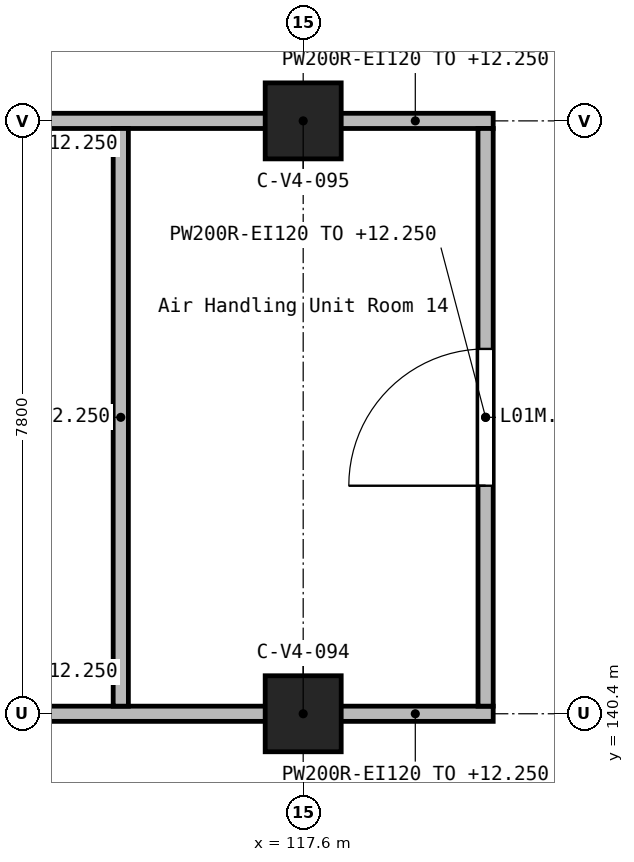
"""IFC4 building model, lengths in metres.
Left out: names, types, materials, properties, quantities, classifications, styles, units other than length and angle.
Written with IfcOpenShell. Run it as: python <this file> out.ifc"""

import sys

from ifc_helpers import new_model, si_unit, direction, frame, frame_2d, origin, origin_2d, place, context, subcontext, project, spatial, rectangle, extrude, element, fill, save


model = new_model("IFC4")
c1 = context("Model", 3, precision=1e-05, world=origin(), true_north=direction((0.0, 1.0)))
c2 = subcontext(c1, "Body", "Model", "MODEL_VIEW")
j1 = project(units=[si_unit("LENGTHUNIT", "METRE"), si_unit("PLANEANGLEUNIT", "RADIAN")], contexts=[c1])
p1 = place(None, origin())
s1 = spatial("IfcSite", under=j1, at=p1, CompositionType="ELEMENT")
p2 = place(p1, origin())
s2 = spatial("IfcBuilding", under=s1, at=p2, CompositionType="ELEMENT")
p3 = place(p2, frame((0.0, 0.0, 9.9)))
s3 = spatial("IfcBuildingStorey", under=s2, at=p3, CompositionType="ELEMENT", Elevation=9.9)
for number, where, z_axis, x_axis in (
    (1, (117.6, 140.4, 0.0), (0.0, 0.0, 1.0), (1.0, 0.0, 0.0)),
    (2, (117.6, 148.2, 0.0), (0.0, 0.0, 1.0), (1.0, 0.0, 0.0)),
):
    element("IfcColumn", number, at=place(p3, frame(where, z_axis=z_axis, x_axis=x_axis)), inside=s3, PredefinedType="COLUMN", context=c2, shape_type="SweptSolid", body=[
        extrude(rectangle(XDim=1.0, YDim=1.0, at=origin_2d()), origin(), (0.0, 0.0, 1.0), 2.7),
    ])
p4 = place(p3, frame((120.1, 140.4, 0.0), z_axis=(0.0, 0.0, 1.0), x_axis=(-1.0, 0.0, 0.0)))
e3 = element("IfcWall", 3, at=p4, inside=s3, PredefinedType="SOLIDWALL", context=c2, shape_type="SweptSolid", body=[
    extrude(rectangle(XDim=2.05, YDim=0.2, at=frame_2d((1.025, 0.0))), origin(), (0.0, 0.0, 1.0), 2.35),
])
p5 = place(p3, frame((117.15, 140.4, 0.0), z_axis=(0.0, 0.0, 1.0), x_axis=(-1.0, 0.0, 0.0)))
e4 = element("IfcWall", 4, at=p5, inside=s3, PredefinedType="SOLIDWALL", context=c2, shape_type="SweptSolid", body=[
    extrude(rectangle(XDim=7.5, YDim=0.2, at=frame_2d((3.75, 0.0))), origin(), (0.0, 0.0, 1.0), 2.35),
])
p6 = place(p5, frame((4.05, 0.0, 0.0)))
e5 = element("IfcOpeningElement", 5, at=p6, cuts=e4, PredefinedType="OPENING", context=c2, shape_type="SweptSolid", body=[
    extrude(rectangle(XDim=1.8, YDim=2.1, at=frame_2d((0.9, 1.05))), frame((0.0, 0.11, 0.0), z_axis=(0.0, -1.0, 0.0), x_axis=(1.0, 0.0, 0.0)), (0.0, 0.0, 1.0), 0.22),
])
p7 = place(p3, frame((120.1, 148.2, 0.0), z_axis=(0.0, 0.0, 1.0), x_axis=(-1.0, 0.0, 0.0)))
e6 = element("IfcWall", 6, at=p7, inside=s3, PredefinedType="SOLIDWALL", context=c2, shape_type="SweptSolid", body=[
    extrude(rectangle(XDim=2.05, YDim=0.2, at=frame_2d((1.025, 0.0))), origin(), (0.0, 0.0, 1.0), 2.35),
])
p8 = place(p3, frame((117.15, 148.2, 0.0), z_axis=(0.0, 0.0, 1.0), x_axis=(-1.0, 0.0, 0.0)))
e7 = element("IfcWall", 7, at=p8, inside=s3, PredefinedType="SOLIDWALL", context=c2, shape_type="SweptSolid", body=[
    extrude(rectangle(XDim=7.5, YDim=0.2, at=frame_2d((3.75, 0.0))), origin(), (0.0, 0.0, 1.0), 2.35),
])
p9 = place(p3, frame((115.2, 140.5, 0.0), z_axis=(0.0, 0.0, 1.0), x_axis=(0.0, 1.0, 0.0)))
e8 = element("IfcWall", 8, at=p9, inside=s3, PredefinedType="SOLIDWALL", context=c2, shape_type="SweptSolid", body=[
    extrude(rectangle(XDim=7.6, YDim=0.2, at=frame_2d((3.8, 0.0))), origin(), (0.0, 0.0, 1.0), 2.35),
])
p10 = place(p3, frame((120.0, 140.5, 0.0), z_axis=(0.0, 0.0, 1.0), x_axis=(0.0, 1.0, 0.0)))
e9 = element("IfcWall", 9, at=p10, inside=s3, PredefinedType="SOLIDWALL", context=c2, shape_type="SweptSolid", body=[
    extrude(rectangle(XDim=7.6, YDim=0.2, at=frame_2d((3.8, 0.0))), origin(), (0.0, 0.0, 1.0), 2.35),
])
p11 = place(p10, frame((2.9, 0.0, 0.0)))
e10 = element("IfcOpeningElement", 10, at=p11, cuts=e9, PredefinedType="OPENING", context=c2, shape_type="SweptSolid", body=[
    extrude(rectangle(XDim=1.8, YDim=2.1, at=frame_2d((0.9, 1.05))), frame((0.0, 0.11, 0.0), z_axis=(0.0, -1.0, 0.0), x_axis=(1.0, 0.0, 0.0)), (0.0, 0.0, 1.0), 0.22),
])
p12 = place(p11, origin())
e11 = element("IfcDoor", 11, at=p12, inside=s3, OperationType="DOUBLE_DOOR_SINGLE_SWING", PredefinedType="DOOR", context=c2, shape_type="SweptSolid", body=[
    extrude(rectangle(XDim=1.8, YDim=2.1, at=frame_2d((0.9, 1.05))), frame((0.0, 0.025, 0.0), z_axis=(0.0, -1.0, 0.0), x_axis=(1.0, 0.0, 0.0)), (0.0, 0.0, 1.0), 0.05),
])
fill(e10, e11)
save(model, sys.argv[1])
